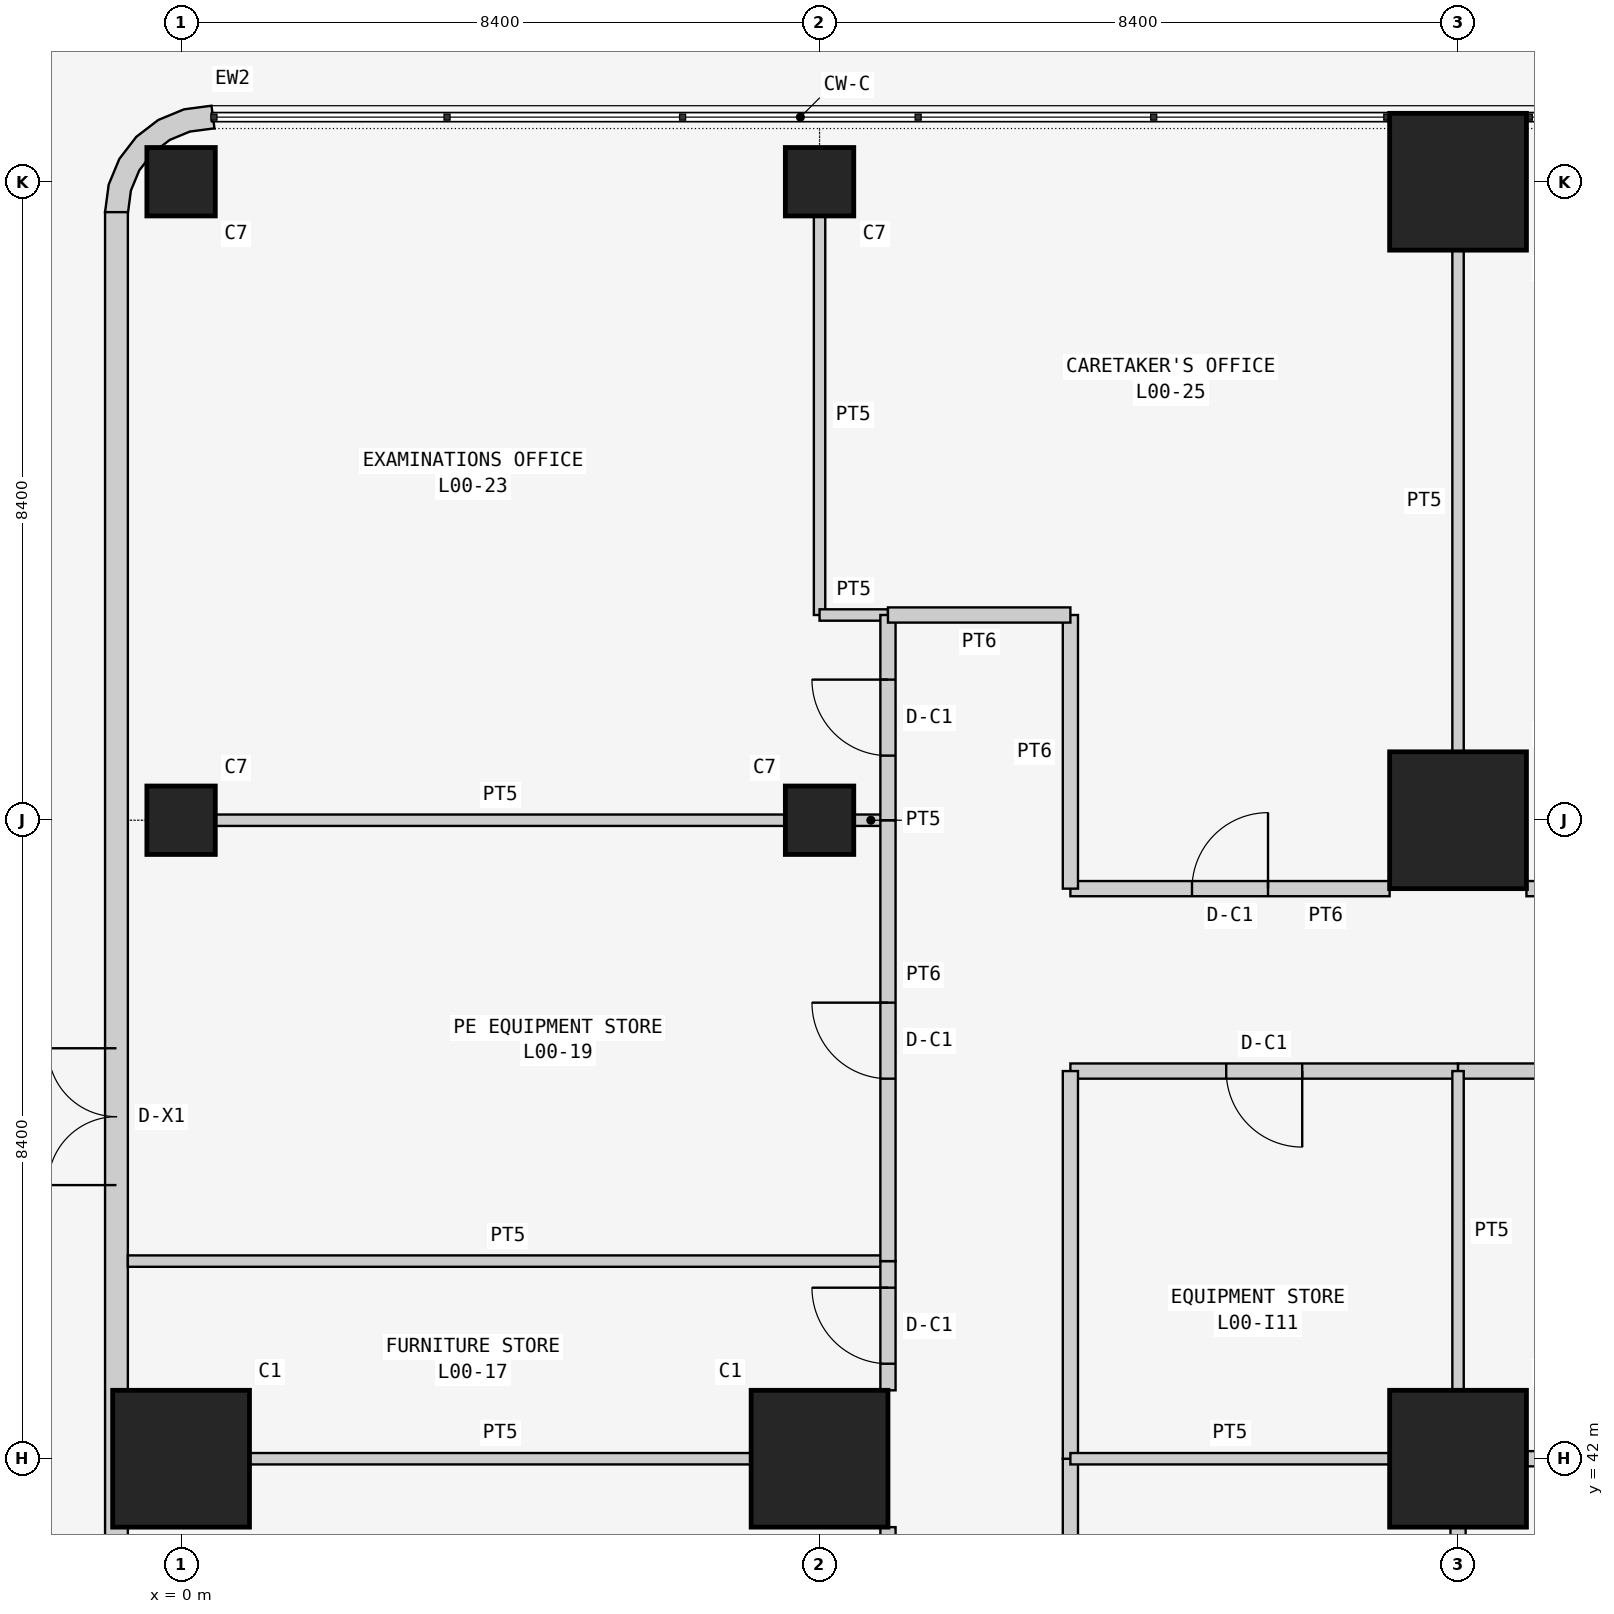
"""IFC4 building model, lengths in metres.
Left out: names, types, materials, properties, quantities, classifications, styles, units other than length and angle.
Written with IfcOpenShell. Run it as: python <this file> out.ifc"""

import sys

from ifc_helpers import new_model, si_unit, direction, frame, frame_2d, origin, origin_2d, place, context, subcontext, project, spatial, polyline, rectangle, outline, extrude, element, fill, save


model = new_model("IFC4")
c1 = context("Model", 3, precision=1e-05, world=origin(), true_north=direction((0.0, 1.0)))
c2 = subcontext(c1, "Body", "Model", "MODEL_VIEW")
j1 = project(units=[si_unit("LENGTHUNIT", "METRE"), si_unit("PLANEANGLEUNIT", "RADIAN")], contexts=[c1])
p1 = place(None, origin())
s1 = spatial("IfcSite", under=j1, at=p1, CompositionType="ELEMENT")
p2 = place(p1, origin())
s2 = spatial("IfcBuilding", under=s1, at=p2, CompositionType="ELEMENT")
p3 = place(p2, origin())
s3 = spatial("IfcBuildingStorey", under=s2, at=p3, CompositionType="ELEMENT", Elevation=0.0)
p4 = place(p3, frame((0.0, 42.0, 0.0), z_axis=(0.0, 0.0, 1.0), x_axis=(1.0, 0.0, 0.0)))
e1 = element("IfcColumn", 1, at=p4, inside=s3, PredefinedType="COLUMN", context=c2, shape_type="SweptSolid", body=[
    extrude(rectangle(XDim=1.8, YDim=1.8, at=origin_2d()), origin(), (0.0, 0.0, 1.0), 6.0),
])
for number, where, z_axis, x_axis in (
    (2, (0.0, 50.4, 0.0), (0.0, 0.0, 1.0), (1.0, 0.0, 0.0)),
    (3, (0.0, 58.8, 0.0), (0.0, 0.0, 1.0), (1.0, 0.0, 0.0)),
):
    element("IfcColumn", number, at=place(p3, frame(where, z_axis=z_axis, x_axis=x_axis)), inside=s3, PredefinedType="COLUMN", context=c2, shape_type="SweptSolid", body=[
        extrude(rectangle(XDim=0.9, YDim=0.9, at=origin_2d()), origin(), (0.0, 0.0, 1.0), 6.0),
    ])
p5 = place(p3, frame((8.4, 42.0, 0.0), z_axis=(0.0, 0.0, 1.0), x_axis=(1.0, 0.0, 0.0)))
e4 = element("IfcColumn", 4, at=p5, inside=s3, PredefinedType="COLUMN", context=c2, shape_type="SweptSolid", body=[
    extrude(rectangle(XDim=1.8, YDim=1.8, at=origin_2d()), origin(), (0.0, 0.0, 1.0), 6.0),
])
for number, where, z_axis, x_axis in (
    (5, (8.4, 50.4, 0.0), (0.0, 0.0, 1.0), (1.0, 0.0, 0.0)),
    (6, (8.4, 58.8, 0.0), (0.0, 0.0, 1.0), (1.0, 0.0, 0.0)),
):
    element("IfcColumn", number, at=place(p3, frame(where, z_axis=z_axis, x_axis=x_axis)), inside=s3, PredefinedType="COLUMN", context=c2, shape_type="SweptSolid", body=[
        extrude(rectangle(XDim=0.9, YDim=0.9, at=origin_2d()), origin(), (0.0, 0.0, 1.0), 6.0),
    ])
for number, where, z_axis, x_axis in (
    (7, (16.8, 42.0, 0.0), (0.0, 0.0, 1.0), (1.0, 0.0, 0.0)),
    (8, (16.8, 50.4, 0.0), (0.0, 0.0, 1.0), (1.0, 0.0, 0.0)),
    (9, (16.8, 58.8, 0.0), (0.0, 0.0, 1.0), (1.0, 0.0, 0.0)),
):
    element("IfcColumn", number, at=place(p3, frame(where, z_axis=z_axis, x_axis=x_axis)), inside=s3, PredefinedType="COLUMN", context=c2, shape_type="SweptSolid", body=[
        extrude(rectangle(XDim=1.8, YDim=1.8, at=origin_2d()), origin(), (0.0, 0.0, 1.0), 6.0),
    ])
p6 = place(p3, frame((-0.85, 58.4, 0.0), z_axis=(0.0, 0.0, 1.0), x_axis=(0.0, -1.0, 0.0)))
e10 = element("IfcWall", 10, at=p6, inside=s3, PredefinedType="SOLIDWALL", context=c2, shape_type="SweptSolid", body=[
    extrude(rectangle(XDim=74.8, YDim=0.3, at=frame_2d((37.4, 0.0))), origin(), (0.0, 0.0, 1.0), 5.8),
])
p7 = place(p6, frame((68.0, 0.0, 0.0)))
e11 = element("IfcOpeningElement", 11, at=p7, cuts=e10, PredefinedType="OPENING", context=c2, shape_type="SweptSolid", body=[
    extrude(rectangle(XDim=1.8, YDim=2.4, at=frame_2d((0.9, 1.2))), frame((0.0, 0.16, 0.0), z_axis=(0.0, -1.0, 0.0), x_axis=(1.0, 0.0, 0.0)), (0.0, 0.0, 1.0), 0.32),
])
p8 = place(p6, frame((37.0, 0.0, 0.0)))
e12 = element("IfcOpeningElement", 12, at=p8, cuts=e10, PredefinedType="OPENING", context=c2, shape_type="SweptSolid", body=[
    extrude(rectangle(XDim=1.8, YDim=2.4, at=frame_2d((0.9, 1.2))), frame((0.0, 0.16, 0.0), z_axis=(0.0, -1.0, 0.0), x_axis=(1.0, 0.0, 0.0)), (0.0, 0.0, 1.0), 0.32),
])
p9 = place(p6, frame((11.0, 0.0, 0.0)))
e13 = element("IfcOpeningElement", 13, at=p9, cuts=e10, PredefinedType="OPENING", context=c2, shape_type="SweptSolid", body=[
    extrude(rectangle(XDim=1.8, YDim=2.4, at=frame_2d((0.9, 1.2))), frame((0.0, 0.16, 0.0), z_axis=(0.0, -1.0, 0.0), x_axis=(1.0, 0.0, 0.0)), (0.0, 0.0, 1.0), 0.32),
])
p10 = place(p3, frame((0.445, 59.648, 0.0), z_axis=(0.0, 0.0, 1.0), x_axis=(-0.707106781187, 0.707106781187, 0.0)))
e14 = element("IfcWall", 14, at=p10, inside=s3, PredefinedType="SOLIDWALL", context=c2, shape_type="SweptSolid", body=[
    extrude(outline(polyline([(0.139, 1.904), (-0.101, 1.72), (-0.087, 1.706), (0.1, 1.463), (0.209, 1.198), (0.247, 0.914), (0.209, 0.63), (0.1, 0.365), (-0.087, 0.122), (-0.101, 0.108), (0.139, -0.076), (0.362, 0.214), (0.502, 0.552), (0.549, 0.914), (0.502, 1.276), (0.362, 1.614), (0.139, 1.904)])), origin(), (0.0, 0.0, 1.0), 5.8),
])
p11 = place(p3, frame((0.9, 42.0, 0.0), z_axis=(0.0, 0.0, 1.0), x_axis=(1.0, 0.0, 0.0)))
e15 = element("IfcWall", 15, at=p11, inside=s3, PredefinedType="PARTITIONING", context=c2, shape_type="SweptSolid", body=[
    extrude(rectangle(XDim=6.6, YDim=0.15, at=frame_2d((3.3, 0.0))), origin(), (0.0, 0.0, 1.0), 5.043),
])
p12 = place(p3, frame((9.3, 41.1, 0.0), z_axis=(0.0, 0.0, 1.0), x_axis=(0.0, -1.0, 0.0)))
e16 = element("IfcWall", 16, at=p12, inside=s3, PredefinedType="PARTITIONING", context=c2, shape_type="SweptSolid", body=[
    extrude(rectangle(XDim=6.6, YDim=0.2, at=frame_2d((3.3, 0.0))), origin(), (0.0, 0.0, 1.0), 5.8),
])
p13 = place(p12, frame((2.8, 0.0, 0.0)))
e17 = element("IfcOpeningElement", 17, at=p13, cuts=e16, PredefinedType="OPENING", context=c2, shape_type="SweptSolid", body=[
    extrude(rectangle(XDim=1.0, YDim=2.1, at=frame_2d((0.5, 1.05))), frame((0.0, 0.11, 0.0), z_axis=(0.0, -1.0, 0.0), x_axis=(1.0, 0.0, 0.0)), (0.0, 0.0, 1.0), 0.22),
])
p14 = place(p3, frame((-0.7, 44.6, 0.0), z_axis=(0.0, 0.0, 1.0), x_axis=(1.0, 0.0, 0.0)))
e18 = element("IfcWall", 18, at=p14, inside=s3, PredefinedType="PARTITIONING", context=c2, shape_type="SweptSolid", body=[
    extrude(rectangle(XDim=10.0, YDim=0.15, at=frame_2d((5.0, 0.0))), origin(), (0.0, 0.0, 1.0), 5.8),
])
p15 = place(p3, frame((9.3, 44.6, 0.0), z_axis=(0.0, 0.0, 1.0), x_axis=(0.0, -1.0, 0.0)))
e19 = element("IfcWall", 19, at=p15, inside=s3, PredefinedType="PARTITIONING", context=c2, shape_type="SweptSolid", body=[
    extrude(rectangle(XDim=1.7, YDim=0.2, at=frame_2d((0.85, 0.0))), origin(), (0.0, 0.0, 1.0), 5.8),
])
p16 = place(p15, frame((0.35, 0.0, 0.0)))
e20 = element("IfcOpeningElement", 20, at=p16, cuts=e19, PredefinedType="OPENING", context=c2, shape_type="SweptSolid", body=[
    extrude(rectangle(XDim=1.0, YDim=2.1, at=frame_2d((0.5, 1.05))), frame((0.0, 0.11, 0.0), z_axis=(0.0, -1.0, 0.0), x_axis=(1.0, 0.0, 0.0)), (0.0, 0.0, 1.0), 0.22),
])
p17 = place(p3, frame((0.45, 50.4, 0.0), z_axis=(0.0, 0.0, 1.0), x_axis=(1.0, 0.0, 0.0)))
e21 = element("IfcWall", 21, at=p17, inside=s3, PredefinedType="PARTITIONING", context=c2, shape_type="SweptSolid", body=[
    extrude(rectangle(XDim=7.5, YDim=0.15, at=frame_2d((3.75, 0.0))), origin(), (0.0, 0.0, 1.0), 5.043),
])
p18 = place(p3, frame((8.85, 50.4, 0.0), z_axis=(0.0, 0.0, 1.0), x_axis=(1.0, 0.0, 0.0)))
e22 = element("IfcWall", 22, at=p18, inside=s3, PredefinedType="PARTITIONING", context=c2, shape_type="SweptSolid", body=[
    extrude(rectangle(XDim=0.45, YDim=0.15, at=frame_2d((0.225, 0.0))), origin(), (0.0, 0.0, 1.0), 5.043),
])
p19 = place(p3, frame((9.3, 50.4, 0.0), z_axis=(0.0, 0.0, 1.0), x_axis=(0.0, -1.0, 0.0)))
e23 = element("IfcWall", 23, at=p19, inside=s3, PredefinedType="PARTITIONING", context=c2, shape_type="SweptSolid", body=[
    extrude(rectangle(XDim=5.8, YDim=0.2, at=frame_2d((2.9, 0.0))), origin(), (0.0, 0.0, 1.0), 5.8),
])
p20 = place(p19, frame((2.4, 0.0, 0.0)))
e24 = element("IfcOpeningElement", 24, at=p20, cuts=e23, PredefinedType="OPENING", context=c2, shape_type="SweptSolid", body=[
    extrude(rectangle(XDim=1.0, YDim=2.1, at=frame_2d((0.5, 1.05))), frame((0.0, 0.11, 0.0), z_axis=(0.0, -1.0, 0.0), x_axis=(1.0, 0.0, 0.0)), (0.0, 0.0, 1.0), 0.22),
])
p21 = place(p3, frame((16.8, 51.3, 0.0), z_axis=(0.0, 0.0, 1.0), x_axis=(0.0, 1.0, 0.0)))
e25 = element("IfcWall", 25, at=p21, inside=s3, PredefinedType="PARTITIONING", context=c2, shape_type="SweptSolid", body=[
    extrude(rectangle(XDim=6.6, YDim=0.15, at=frame_2d((3.3, 0.0))), origin(), (0.0, 0.0, 1.0), 5.043),
])
p22 = place(p3, frame((24.3, 49.5, 0.0), z_axis=(0.0, 0.0, 1.0), x_axis=(-1.0, 0.0, 0.0)))
e26 = element("IfcWall", 26, at=p22, inside=s3, PredefinedType="PARTITIONING", context=c2, shape_type="SweptSolid", body=[
    extrude(rectangle(XDim=6.6, YDim=0.2, at=frame_2d((3.3, 0.0))), origin(), (0.0, 0.0, 1.0), 5.8),
])
p23 = place(p22, frame((2.8, 0.0, 0.0)))
e27 = element("IfcOpeningElement", 27, at=p23, cuts=e26, PredefinedType="OPENING", context=c2, shape_type="SweptSolid", body=[
    extrude(rectangle(XDim=1.0, YDim=2.1, at=frame_2d((0.5, 1.05))), frame((0.0, 0.11, 0.0), z_axis=(0.0, -1.0, 0.0), x_axis=(1.0, 0.0, 0.0)), (0.0, 0.0, 1.0), 0.22),
])
p24 = place(p3, frame((8.4, 58.35, 0.0), z_axis=(0.0, 0.0, 1.0), x_axis=(0.0, -1.0, 0.0)))
e28 = element("IfcWall", 28, at=p24, inside=s3, PredefinedType="PARTITIONING", context=c2, shape_type="SweptSolid", body=[
    extrude(rectangle(XDim=5.25, YDim=0.15, at=frame_2d((2.625, 0.0))), origin(), (0.0, 0.0, 1.0), 5.043),
])
p25 = place(p3, frame((8.4, 53.1, 0.0), z_axis=(0.0, 0.0, 1.0), x_axis=(1.0, 0.0, 0.0)))
e29 = element("IfcWall", 29, at=p25, inside=s3, PredefinedType="PARTITIONING", context=c2, shape_type="SweptSolid", body=[
    extrude(rectangle(XDim=0.9, YDim=0.15, at=frame_2d((0.45, 0.0))), origin(), (0.0, 0.0, 1.0), 5.8),
])
p26 = place(p3, frame((9.3, 53.1, 0.0), z_axis=(0.0, 0.0, 1.0), x_axis=(0.0, -1.0, 0.0)))
e30 = element("IfcWall", 30, at=p26, inside=s3, PredefinedType="PARTITIONING", context=c2, shape_type="SweptSolid", body=[
    extrude(rectangle(XDim=2.7, YDim=0.2, at=frame_2d((1.35, 0.0))), origin(), (0.0, 0.0, 1.0), 5.8),
])
p27 = place(p26, frame((0.85, 0.0, 0.0)))
e31 = element("IfcOpeningElement", 31, at=p27, cuts=e30, PredefinedType="OPENING", context=c2, shape_type="SweptSolid", body=[
    extrude(rectangle(XDim=1.0, YDim=2.1, at=frame_2d((0.5, 1.05))), frame((0.0, 0.11, 0.0), z_axis=(0.0, -1.0, 0.0), x_axis=(1.0, 0.0, 0.0)), (0.0, 0.0, 1.0), 0.22),
])
p28 = place(p3, frame((15.9, 49.5, 0.0), z_axis=(0.0, 0.0, 1.0), x_axis=(-1.0, 0.0, 0.0)))
e32 = element("IfcWall", 32, at=p28, inside=s3, PredefinedType="PARTITIONING", context=c2, shape_type="SweptSolid", body=[
    extrude(rectangle(XDim=4.2, YDim=0.2, at=frame_2d((2.1, 0.0))), origin(), (0.0, 0.0, 1.0), 5.8),
])
p29 = place(p28, frame((1.6, 0.0, 0.0)))
e33 = element("IfcOpeningElement", 33, at=p29, cuts=e32, PredefinedType="OPENING", context=c2, shape_type="SweptSolid", body=[
    extrude(rectangle(XDim=1.0, YDim=2.1, at=frame_2d((0.5, 1.05))), frame((0.0, 0.11, 0.0), z_axis=(0.0, -1.0, 0.0), x_axis=(1.0, 0.0, 0.0)), (0.0, 0.0, 1.0), 0.22),
])
p30 = place(p3, frame((11.7, 49.5, 0.0), z_axis=(0.0, 0.0, 1.0), x_axis=(0.0, 1.0, 0.0)))
e34 = element("IfcWall", 34, at=p30, inside=s3, PredefinedType="PARTITIONING", context=c2, shape_type="SweptSolid", body=[
    extrude(rectangle(XDim=3.6, YDim=0.2, at=frame_2d((1.8, 0.0))), origin(), (0.0, 0.0, 1.0), 5.8),
])
p31 = place(p3, frame((11.7, 53.1, 0.0), z_axis=(0.0, 0.0, 1.0), x_axis=(-1.0, 0.0, 0.0)))
e35 = element("IfcWall", 35, at=p31, inside=s3, PredefinedType="PARTITIONING", context=c2, shape_type="SweptSolid", body=[
    extrude(rectangle(XDim=2.4, YDim=0.2, at=frame_2d((1.2, 0.0))), origin(), (0.0, 0.0, 1.0), 5.8),
])
p32 = place(p3, frame((11.7, 42.0, 0.0), z_axis=(0.0, 0.0, 1.0), x_axis=(0.0, -1.0, 0.0)))
e36 = element("IfcWall", 36, at=p32, inside=s3, PredefinedType="PARTITIONING", context=c2, shape_type="SweptSolid", body=[
    extrude(rectangle(XDim=8.4, YDim=0.2, at=frame_2d((4.2, 0.0))), origin(), (0.0, 0.0, 1.0), 5.8),
])
p33 = place(p32, frame((3.7, 0.0, 0.0)))
e37 = element("IfcOpeningElement", 37, at=p33, cuts=e36, PredefinedType="OPENING", context=c2, shape_type="SweptSolid", body=[
    extrude(rectangle(XDim=1.0, YDim=2.1, at=frame_2d((0.5, 1.05))), frame((0.0, 0.11, 0.0), z_axis=(0.0, -1.0, 0.0), x_axis=(1.0, 0.0, 0.0)), (0.0, 0.0, 1.0), 0.22),
])
p34 = place(p3, frame((16.8, 47.1, 0.0), z_axis=(0.0, 0.0, 1.0), x_axis=(-1.0, 0.0, 0.0)))
e38 = element("IfcWall", 38, at=p34, inside=s3, PredefinedType="PARTITIONING", context=c2, shape_type="SweptSolid", body=[
    extrude(rectangle(XDim=5.1, YDim=0.2, at=frame_2d((2.55, 0.0))), origin(), (0.0, 0.0, 1.0), 5.8),
])
p35 = place(p34, frame((2.05, 0.0, 0.0)))
e39 = element("IfcOpeningElement", 39, at=p35, cuts=e38, PredefinedType="OPENING", context=c2, shape_type="SweptSolid", body=[
    extrude(rectangle(XDim=1.0, YDim=2.1, at=frame_2d((0.5, 1.05))), frame((0.0, 0.11, 0.0), z_axis=(0.0, -1.0, 0.0), x_axis=(1.0, 0.0, 0.0)), (0.0, 0.0, 1.0), 0.22),
])
p36 = place(p3, frame((11.7, 47.1, 0.0), z_axis=(0.0, 0.0, 1.0), x_axis=(0.0, -1.0, 0.0)))
e40 = element("IfcWall", 40, at=p36, inside=s3, PredefinedType="PARTITIONING", context=c2, shape_type="SweptSolid", body=[
    extrude(rectangle(XDim=5.1, YDim=0.2, at=frame_2d((2.55, 0.0))), origin(), (0.0, 0.0, 1.0), 5.8),
])
p37 = place(p3, frame((42.0, 47.1, 0.0), z_axis=(0.0, 0.0, 1.0), x_axis=(-1.0, 0.0, 0.0)))
e41 = element("IfcWall", 41, at=p37, inside=s3, PredefinedType="PARTITIONING", context=c2, shape_type="SweptSolid", body=[
    extrude(rectangle(XDim=25.2, YDim=0.2, at=frame_2d((12.6, 0.0))), origin(), (0.0, 0.0, 1.0), 5.8),
])
p38 = place(p37, frame((11.7, 0.0, 0.0)))
e42 = element("IfcOpeningElement", 42, at=p38, cuts=e41, PredefinedType="OPENING", context=c2, shape_type="SweptSolid", body=[
    extrude(rectangle(XDim=1.8, YDim=2.4, at=frame_2d((0.9, 1.2))), frame((0.0, 0.11, 0.0), z_axis=(0.0, -1.0, 0.0), x_axis=(1.0, 0.0, 0.0)), (0.0, 0.0, 1.0), 0.22),
])
p39 = place(p3, frame((16.8, 34.5, 0.0), z_axis=(0.0, 0.0, 1.0), x_axis=(0.0, 1.0, 0.0)))
e43 = element("IfcWall", 43, at=p39, inside=s3, PredefinedType="PARTITIONING", context=c2, shape_type="SweptSolid", body=[
    extrude(rectangle(XDim=6.6, YDim=0.2, at=frame_2d((3.3, 0.0))), origin(), (0.0, 0.0, 1.0), 5.043),
])
p40 = place(p3, frame((17.7, 42.0, 0.0), z_axis=(0.0, 0.0, 1.0), x_axis=(1.0, 0.0, 0.0)))
e44 = element("IfcWall", 44, at=p40, inside=s3, PredefinedType="PARTITIONING", context=c2, shape_type="SweptSolid", body=[
    extrude(rectangle(XDim=2.8, YDim=0.2, at=frame_2d((1.4, 0.0))), origin(), (0.0, 0.0, 1.0), 5.043),
])
p41 = place(p3, frame((11.7, 42.0, 0.0), z_axis=(0.0, 0.0, 1.0), x_axis=(1.0, 0.0, 0.0)))
e45 = element("IfcWall", 45, at=p41, inside=s3, PredefinedType="PARTITIONING", context=c2, shape_type="SweptSolid", body=[
    extrude(rectangle(XDim=4.2, YDim=0.15, at=frame_2d((2.1, 0.0))), origin(), (0.0, 0.0, 1.0), 5.043),
])
p42 = place(p3, frame((16.8, 47.1, 0.0), z_axis=(0.0, 0.0, 1.0), x_axis=(0.0, -1.0, 0.0)))
e46 = element("IfcWall", 46, at=p42, inside=s3, PredefinedType="PARTITIONING", context=c2, shape_type="SweptSolid", body=[
    extrude(rectangle(XDim=4.2, YDim=0.15, at=frame_2d((2.1, 0.0))), origin(), (0.0, 0.0, 1.0), 5.043),
])
p43 = place(p9, frame((1.8, 0.0, 0.0), z_axis=(0.0, 0.0, 1.0), x_axis=(-1.0, 0.0, 0.0)))
e47 = element("IfcDoor", 47, at=p43, inside=s3, OperationType="DOUBLE_DOOR_SINGLE_SWING", PredefinedType="DOOR", context=c2, shape_type="SweptSolid", body=[
    extrude(rectangle(XDim=1.8, YDim=2.4, at=frame_2d((0.9, 1.2))), frame((0.0, 0.025, 0.0), z_axis=(0.0, -1.0, 0.0), x_axis=(1.0, 0.0, 0.0)), (0.0, 0.0, 1.0), 0.05),
])
fill(e13, e47)
p44 = place(p16, frame((1.0, 0.0, 0.0), z_axis=(0.0, 0.0, 1.0), x_axis=(-1.0, 0.0, 0.0)))
e48 = element("IfcDoor", 48, at=p44, inside=s3, OperationType="SINGLE_SWING_RIGHT", PredefinedType="DOOR", context=c2, shape_type="SweptSolid", body=[
    extrude(rectangle(XDim=1.0, YDim=2.1, at=frame_2d((0.5, 1.05))), frame((0.0, 0.025, 0.0), z_axis=(0.0, -1.0, 0.0), x_axis=(1.0, 0.0, 0.0)), (0.0, 0.0, 1.0), 0.05),
])
fill(e20, e48)
p45 = place(p20, frame((1.0, 0.0, 0.0), z_axis=(0.0, 0.0, 1.0), x_axis=(-1.0, 0.0, 0.0)))
e49 = element("IfcDoor", 49, at=p45, inside=s3, OperationType="SINGLE_SWING_RIGHT", PredefinedType="DOOR", context=c2, shape_type="SweptSolid", body=[
    extrude(rectangle(XDim=1.0, YDim=2.1, at=frame_2d((0.5, 1.05))), frame((0.0, 0.025, 0.0), z_axis=(0.0, -1.0, 0.0), x_axis=(1.0, 0.0, 0.0)), (0.0, 0.0, 1.0), 0.05),
])
fill(e24, e49)
p46 = place(p27, frame((1.0, 0.0, 0.0), z_axis=(0.0, 0.0, 1.0), x_axis=(-1.0, 0.0, 0.0)))
e50 = element("IfcDoor", 50, at=p46, inside=s3, OperationType="SINGLE_SWING_RIGHT", PredefinedType="DOOR", context=c2, shape_type="SweptSolid", body=[
    extrude(rectangle(XDim=1.0, YDim=2.1, at=frame_2d((0.5, 1.05))), frame((0.0, 0.025, 0.0), z_axis=(0.0, -1.0, 0.0), x_axis=(1.0, 0.0, 0.0)), (0.0, 0.0, 1.0), 0.05),
])
fill(e31, e50)
p47 = place(p29, frame((1.0, 0.0, 0.0), z_axis=(0.0, 0.0, 1.0), x_axis=(-1.0, 0.0, 0.0)))
e51 = element("IfcDoor", 51, at=p47, inside=s3, OperationType="SINGLE_SWING_RIGHT", PredefinedType="DOOR", context=c2, shape_type="SweptSolid", body=[
    extrude(rectangle(XDim=1.0, YDim=2.1, at=frame_2d((0.5, 1.05))), frame((0.0, 0.025, 0.0), z_axis=(0.0, -1.0, 0.0), x_axis=(1.0, 0.0, 0.0)), (0.0, 0.0, 1.0), 0.05),
])
fill(e33, e51)
p48 = place(p35, origin())
e52 = element("IfcDoor", 52, at=p48, inside=s3, OperationType="SINGLE_SWING_LEFT", PredefinedType="DOOR", context=c2, shape_type="SweptSolid", body=[
    extrude(rectangle(XDim=1.0, YDim=2.1, at=frame_2d((0.5, 1.05))), frame((0.0, 0.025, 0.0), z_axis=(0.0, -1.0, 0.0), x_axis=(1.0, 0.0, 0.0)), (0.0, 0.0, 1.0), 0.05),
])
fill(e39, e52)
save(model, sys.argv[1])
